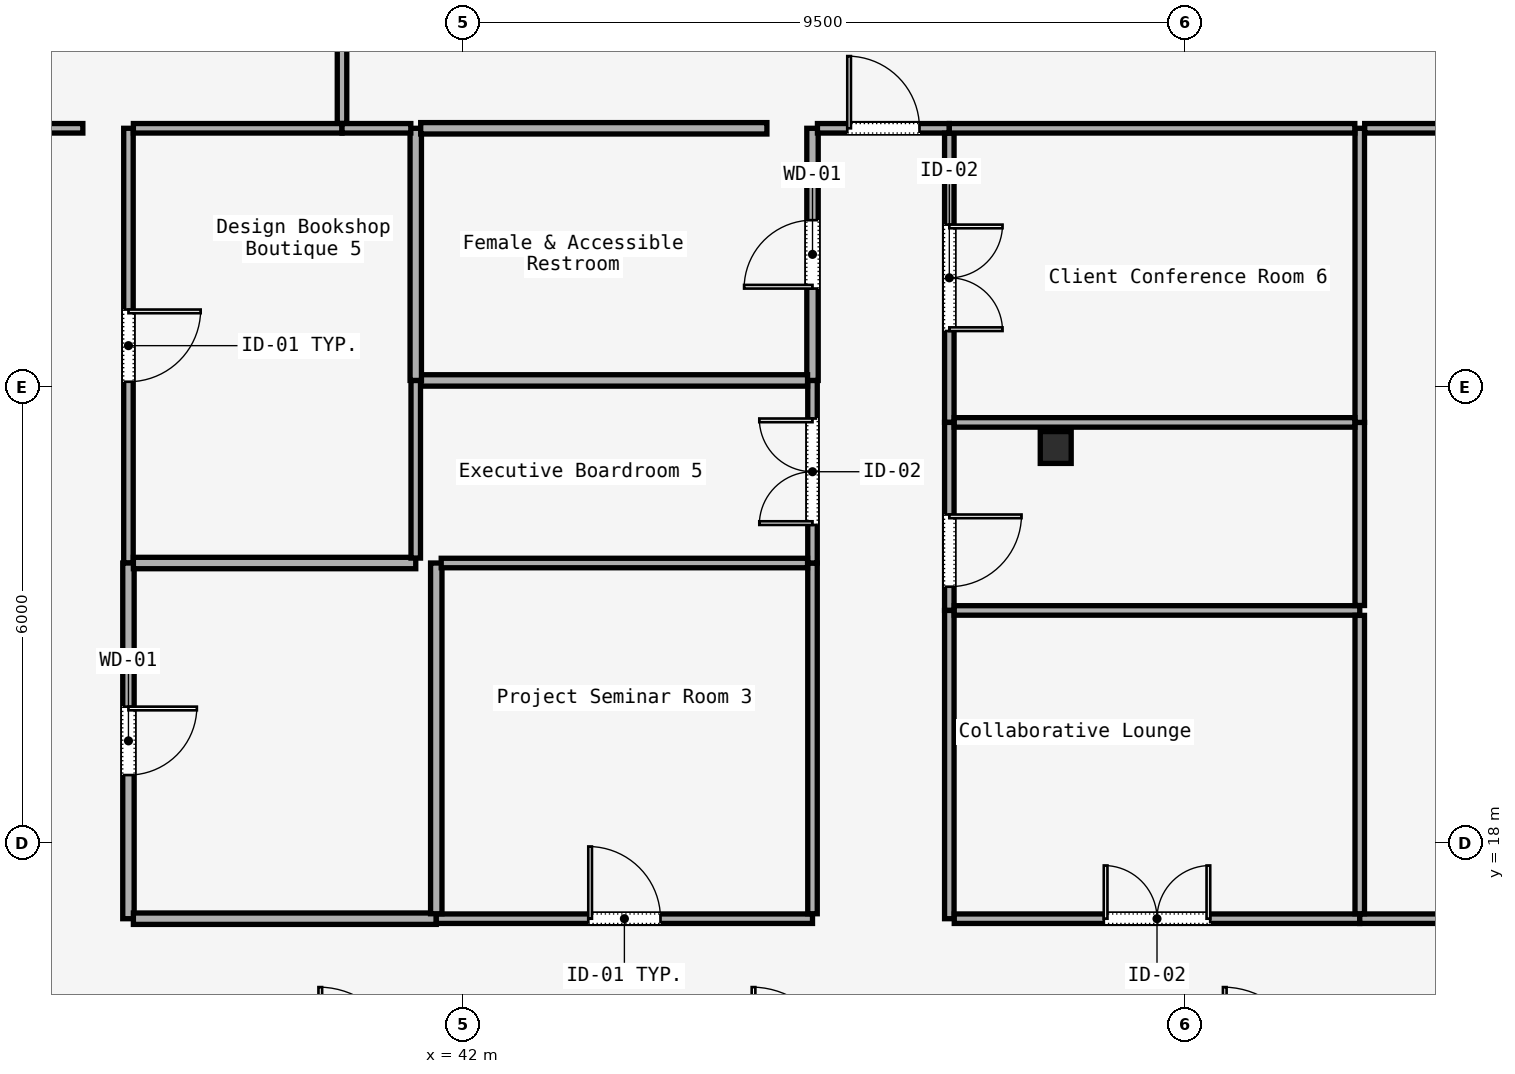
"""IFC4 building model, lengths in metres.
Left out: names, types, materials, properties, quantities, classifications, styles, units other than length and angle.
Written with IfcOpenShell. Run it as: python <this file> out.ifc"""

import sys

from ifc_helpers import new_model, si_unit, direction, frame, frame_2d, origin, origin_2d, place, context, subcontext, project, spatial, rectangle, i_section, extrude, element, fill, save


model = new_model("IFC4")
c1 = context("Model", 3, precision=1e-05, world=origin(), true_north=direction((0.0, 1.0)))
c2 = subcontext(c1, "Body", "Model", "MODEL_VIEW")
j1 = project(units=[si_unit("LENGTHUNIT", "METRE"), si_unit("PLANEANGLEUNIT", "RADIAN")], contexts=[c1])
p1 = place(None, origin())
s1 = spatial("IfcSite", under=j1, at=p1, CompositionType="ELEMENT")
p2 = place(p1, origin())
s2 = spatial("IfcBuilding", under=s1, at=p2, CompositionType="ELEMENT")
p3 = place(p2, frame((0.0, 0.0, 176.4)))
s3 = spatial("IfcBuildingStorey", under=s2, at=p3, CompositionType="ELEMENT", Elevation=176.4)
p4 = place(p3, frame((49.8, 23.2, 0.0), z_axis=(0.0, 0.0, 1.0), x_axis=(1.0, 0.0, 0.0)))
e1 = element("IfcColumn", 1, at=p4, inside=s3, PredefinedType="COLUMN", context=c2, shape_type="SweptSolid", body=[
    extrude(i_section(OverallWidth=0.407, OverallDepth=0.419, WebThickness=0.031, FlangeThickness=0.049, FilletRadius=0.015, at=origin_2d()), origin(), (0.0, 0.0, 1.0), 3.58),
])
p5 = place(p3, frame((35.865, 27.4, 0.0), z_axis=(0.0, 0.0, 1.0), x_axis=(1.0, 0.0, 0.0)))
e2 = element("IfcWall", 2, at=p5, inside=s3, PredefinedType="PARTITIONING", context=c2, shape_type="SweptSolid", body=[
    extrude(rectangle(XDim=1.135, YDim=0.125, at=frame_2d((0.567, 0.0))), origin(), (0.0, 0.0, 1.0), 3.01),
])
p6 = place(p3, frame((37.6, 27.4, 0.0), z_axis=(0.0, 0.0, 1.0), x_axis=(0.0, -1.0, 0.0)))
e3 = element("IfcWall", 3, at=p6, inside=s3, PredefinedType="PARTITIONING", context=c2, shape_type="SweptSolid", body=[
    extrude(rectangle(XDim=5.72, YDim=0.125, at=frame_2d((2.86, 0.0))), origin(), (0.0, 0.0, 1.0), 3.01),
])
p7 = place(p6, frame((2.385, 0.0, 0.0)))
e4 = element("IfcOpeningElement", 4, at=p7, cuts=e3, PredefinedType="OPENING", context=c2, shape_type="SweptSolid", body=[
    extrude(rectangle(XDim=0.95, YDim=2.2, at=frame_2d((0.475, 1.1))), frame((0.0, 0.062, 0.0), z_axis=(0.0, -1.0, 0.0), x_axis=(1.0, 0.0, 0.0)), (0.0, 0.0, 1.0), 0.125),
])
p8 = place(p3, frame((37.6, 21.68, 0.0), z_axis=(0.0, 0.0, 1.0), x_axis=(0.0, -1.0, 0.0)))
e5 = element("IfcWall", 5, at=p8, inside=s3, PredefinedType="PARTITIONING", context=c2, shape_type="SweptSolid", body=[
    extrude(rectangle(XDim=4.68, YDim=0.15, at=frame_2d((2.34, 0.0))), origin(), (0.0, 0.0, 1.0), 3.01),
])
p9 = place(p8, frame((1.89, 0.0, 0.0)))
e6 = element("IfcOpeningElement", 6, at=p9, cuts=e5, PredefinedType="OPENING", context=c2, shape_type="SweptSolid", body=[
    extrude(rectangle(XDim=0.9, YDim=2.15, at=frame_2d((0.45, 1.075))), frame((0.0, 0.075, 0.0), z_axis=(0.0, -1.0, 0.0), x_axis=(1.0, 0.0, 0.0)), (0.0, 0.0, 1.0), 0.15),
])
p10 = place(p3, frame((37.665, 17.0, 0.0), z_axis=(0.0, 0.0, 1.0), x_axis=(1.0, 0.0, 0.0)))
e7 = element("IfcWall", 7, at=p10, inside=s3, PredefinedType="PARTITIONING", context=c2, shape_type="SweptSolid", body=[
    extrude(rectangle(XDim=3.985, YDim=0.15, at=frame_2d((1.992, 0.0))), origin(), (0.0, 0.0, 1.0), 3.01),
])
p11 = place(p3, frame((41.65, 17.0, 0.0), z_axis=(0.0, 0.0, 1.0), x_axis=(1.0, 0.0, 0.0)))
e8 = element("IfcWall", 8, at=p11, inside=s3, PredefinedType="PARTITIONING", context=c2, shape_type="SweptSolid", body=[
    extrude(rectangle(XDim=4.95, YDim=0.125, at=frame_2d((2.475, 0.0))), origin(), (0.0, 0.0, 1.0), 3.01),
])
p12 = place(p11, frame((2.0, 0.0, 0.0)))
e9 = element("IfcOpeningElement", 9, at=p12, cuts=e8, PredefinedType="OPENING", context=c2, shape_type="SweptSolid", body=[
    extrude(rectangle(XDim=0.95, YDim=2.2, at=frame_2d((0.475, 1.1))), frame((0.0, 0.062, 0.0), z_axis=(0.0, -1.0, 0.0), x_axis=(1.0, 0.0, 0.0)), (0.0, 0.0, 1.0), 0.125),
])
p13 = place(p3, frame((46.6, 17.065, 0.0), z_axis=(0.0, 0.0, 1.0), x_axis=(0.0, 1.0, 0.0)))
e10 = element("IfcWall", 10, at=p13, inside=s3, PredefinedType="PARTITIONING", context=c2, shape_type="SweptSolid", body=[
    extrude(rectangle(XDim=4.615, YDim=0.125, at=frame_2d((2.308, 0.0))), origin(), (0.0, 0.0, 1.0), 3.01),
])
p14 = place(p3, frame((46.6, 21.68, 0.0), z_axis=(0.0, 0.0, 1.0), x_axis=(0.0, 1.0, 0.0)))
e11 = element("IfcWall", 11, at=p14, inside=s3, PredefinedType="PARTITIONING", context=c2, shape_type="SweptSolid", body=[
    extrude(rectangle(XDim=2.403, YDim=0.125, at=frame_2d((1.201, 0.0))), origin(), (0.0, 0.0, 1.0), 3.01),
])
p15 = place(p14, frame((0.501, 0.0, 0.0)))
e12 = element("IfcOpeningElement", 12, at=p15, cuts=e11, PredefinedType="OPENING", context=c2, shape_type="SweptSolid", body=[
    extrude(rectangle(XDim=1.4, YDim=2.2, at=frame_2d((0.7, 1.1))), frame((0.0, 0.062, 0.0), z_axis=(0.0, -1.0, 0.0), x_axis=(1.0, 0.0, 0.0)), (0.0, 0.0, 1.0), 0.125),
])
p16 = place(p3, frame((46.6, 24.083, 0.0), z_axis=(0.0, 0.0, 1.0), x_axis=(0.0, 1.0, 0.0)))
e13 = element("IfcWall", 13, at=p16, inside=s3, PredefinedType="PARTITIONING", context=c2, shape_type="SweptSolid", body=[
    extrude(rectangle(XDim=3.317, YDim=0.15, at=frame_2d((1.659, 0.0))), origin(), (0.0, 0.0, 1.0), 3.01),
])
p17 = place(p16, frame((1.209, 0.0, 0.0)))
e14 = element("IfcOpeningElement", 14, at=p17, cuts=e13, PredefinedType="OPENING", context=c2, shape_type="SweptSolid", body=[
    extrude(rectangle(XDim=0.9, YDim=2.15, at=frame_2d((0.45, 1.075))), frame((0.0, 0.075, 0.0), z_axis=(0.0, -1.0, 0.0), x_axis=(1.0, 0.0, 0.0)), (0.0, 0.0, 1.0), 0.15),
])
p18 = place(p3, frame((46.665, 27.4, 0.0), z_axis=(0.0, 0.0, 1.0), x_axis=(1.0, 0.0, 0.0)))
e15 = element("IfcWall", 15, at=p18, inside=s3, PredefinedType="PARTITIONING", context=c2, shape_type="SweptSolid", body=[
    extrude(rectangle(XDim=1.735, YDim=0.125, at=frame_2d((0.867, 0.0))), origin(), (0.0, 0.0, 1.0), 3.01),
])
p19 = place(p18, frame((0.393, 0.0, 0.0)))
e16 = element("IfcOpeningElement", 16, at=p19, cuts=e15, PredefinedType="OPENING", context=c2, shape_type="SweptSolid", body=[
    extrude(rectangle(XDim=0.95, YDim=2.2, at=frame_2d((0.475, 1.1))), frame((0.0, 0.062, 0.0), z_axis=(0.0, -1.0, 0.0), x_axis=(1.0, 0.0, 0.0)), (0.0, 0.0, 1.0), 0.125),
])
p20 = place(p3, frame((48.4, 27.335, 0.0), z_axis=(0.0, 0.0, 1.0), x_axis=(0.0, -1.0, 0.0)))
e17 = element("IfcWall", 17, at=p20, inside=s3, PredefinedType="PARTITIONING", context=c2, shape_type="SweptSolid", body=[
    extrude(rectangle(XDim=3.805, YDim=0.125, at=frame_2d((1.902, 0.0))), origin(), (0.0, 0.0, 1.0), 3.01),
])
p21 = place(p20, frame((1.202, 0.0, 0.0)))
e18 = element("IfcOpeningElement", 18, at=p21, cuts=e17, PredefinedType="OPENING", context=c2, shape_type="SweptSolid", body=[
    extrude(rectangle(XDim=1.4, YDim=2.2, at=frame_2d((0.7, 1.1))), frame((0.0, 0.062, 0.0), z_axis=(0.0, -1.0, 0.0), x_axis=(1.0, 0.0, 0.0)), (0.0, 0.0, 1.0), 0.125),
])
p22 = place(p3, frame((48.4, 23.53, 0.0), z_axis=(0.0, 0.0, 1.0), x_axis=(0.0, -1.0, 0.0)))
e19 = element("IfcWall", 19, at=p22, inside=s3, PredefinedType="PARTITIONING", context=c2, shape_type="SweptSolid", body=[
    extrude(rectangle(XDim=2.474, YDim=0.125, at=frame_2d((1.237, 0.0))), origin(), (0.0, 0.0, 1.0), 3.01),
])
p23 = place(p22, frame((1.212, 0.0, 0.0)))
e20 = element("IfcOpeningElement", 20, at=p23, cuts=e19, PredefinedType="OPENING", context=c2, shape_type="SweptSolid", body=[
    extrude(rectangle(XDim=0.95, YDim=2.2, at=frame_2d((0.475, 1.1))), frame((0.0, 0.062, 0.0), z_axis=(0.0, -1.0, 0.0), x_axis=(1.0, 0.0, 0.0)), (0.0, 0.0, 1.0), 0.125),
])
p24 = place(p3, frame((48.4, 21.056, 0.0), z_axis=(0.0, 0.0, 1.0), x_axis=(0.0, -1.0, 0.0)))
e21 = element("IfcWall", 21, at=p24, inside=s3, PredefinedType="PARTITIONING", context=c2, shape_type="SweptSolid", body=[
    extrude(rectangle(XDim=4.056, YDim=0.125, at=frame_2d((2.028, 0.0))), origin(), (0.0, 0.0, 1.0), 3.01),
])
p25 = place(p3, frame((48.465, 17.0, 0.0), z_axis=(0.0, 0.0, 1.0), x_axis=(1.0, 0.0, 0.0)))
e22 = element("IfcWall", 22, at=p25, inside=s3, PredefinedType="PARTITIONING", context=c2, shape_type="SweptSolid", body=[
    extrude(rectangle(XDim=5.335, YDim=0.125, at=frame_2d((2.667, 0.0))), origin(), (0.0, 0.0, 1.0), 3.01),
])
p26 = place(p25, frame((1.968, 0.0, 0.0)))
e23 = element("IfcOpeningElement", 23, at=p26, cuts=e22, PredefinedType="OPENING", context=c2, shape_type="SweptSolid", body=[
    extrude(rectangle(XDim=1.4, YDim=2.2, at=frame_2d((0.7, 1.1))), frame((0.0, 0.062, 0.0), z_axis=(0.0, -1.0, 0.0), x_axis=(1.0, 0.0, 0.0)), (0.0, 0.0, 1.0), 0.125),
])
p27 = place(p3, frame((53.8, 17.0, 0.0), z_axis=(0.0, 0.0, 1.0), x_axis=(1.0, 0.0, 0.0)))
e24 = element("IfcWall", 24, at=p27, inside=s3, PredefinedType="PARTITIONING", context=c2, shape_type="SweptSolid", body=[
    extrude(rectangle(XDim=4.535, YDim=0.125, at=frame_2d((2.268, 0.0))), origin(), (0.0, 0.0, 1.0), 3.01),
])
p28 = place(p27, frame((1.792, 0.0, 0.0)))
e25 = element("IfcOpeningElement", 25, at=p28, cuts=e24, PredefinedType="OPENING", context=c2, shape_type="SweptSolid", body=[
    extrude(rectangle(XDim=0.95, YDim=2.2, at=frame_2d((0.475, 1.1))), frame((0.0, 0.062, 0.0), z_axis=(0.0, -1.0, 0.0), x_axis=(1.0, 0.0, 0.0)), (0.0, 0.0, 1.0), 0.125),
])
p29 = place(p3, frame((48.465, 21.056, 0.0), z_axis=(0.0, 0.0, 1.0), x_axis=(1.0, 0.0, 0.0)))
e26 = element("IfcWall", 26, at=p29, inside=s3, PredefinedType="PARTITIONING", context=c2, shape_type="SweptSolid", body=[
    extrude(rectangle(XDim=5.335, YDim=0.125, at=frame_2d((2.667, 0.0))), origin(), (0.0, 0.0, 1.0), 3.01),
])
p30 = place(p3, frame((53.8, 20.991, 0.0), z_axis=(0.0, 0.0, 1.0), x_axis=(0.0, -1.0, 0.0)))
e27 = element("IfcWall", 27, at=p30, inside=s3, PredefinedType="PARTITIONING", context=c2, shape_type="SweptSolid", body=[
    extrude(rectangle(XDim=3.926, YDim=0.125, at=frame_2d((1.963, 0.0))), origin(), (0.0, 0.0, 1.0), 3.01),
])
p31 = place(p3, frame((41.65, 21.68, 0.0), z_axis=(0.0, 0.0, 1.0), x_axis=(0.0, -1.0, 0.0)))
e28 = element("IfcWall", 28, at=p31, inside=s3, PredefinedType="PARTITIONING", context=c2, shape_type="SweptSolid", body=[
    extrude(rectangle(XDim=4.615, YDim=0.15, at=frame_2d((2.308, 0.0))), origin(), (0.0, 0.0, 1.0), 3.01),
])
p32 = place(p3, frame((37.665, 21.68, 0.0), z_axis=(0.0, 0.0, 1.0), x_axis=(1.0, 0.0, 0.0)))
e29 = element("IfcWall", 29, at=p32, inside=s3, PredefinedType="PARTITIONING", context=c2, shape_type="SweptSolid", body=[
    extrude(rectangle(XDim=3.715, YDim=0.15, at=frame_2d((1.857, 0.0))), origin(), (0.0, 0.0, 1.0), 3.01),
])
p33 = place(p3, frame((41.715, 21.68, 0.0), z_axis=(0.0, 0.0, 1.0), x_axis=(1.0, 0.0, 0.0)))
e30 = element("IfcWall", 30, at=p33, inside=s3, PredefinedType="PARTITIONING", context=c2, shape_type="SweptSolid", body=[
    extrude(rectangle(XDim=4.82, YDim=0.125, at=frame_2d((2.41, 0.0))), origin(), (0.0, 0.0, 1.0), 3.01),
])
p34 = place(p3, frame((53.8, 21.121, 0.0), z_axis=(0.0, 0.0, 1.0), x_axis=(0.0, 1.0, 0.0)))
e31 = element("IfcWall", 31, at=p34, inside=s3, PredefinedType="PARTITIONING", context=c2, shape_type="SweptSolid", body=[
    extrude(rectangle(XDim=2.409, YDim=0.125, at=frame_2d((1.205, 0.0))), origin(), (0.0, 0.0, 1.0), 3.01),
])
p35 = place(p3, frame((53.8, 23.53, 0.0), z_axis=(0.0, 0.0, 1.0), x_axis=(0.0, 1.0, 0.0)))
e32 = element("IfcWall", 32, at=p35, inside=s3, PredefinedType="PARTITIONING", context=c2, shape_type="SweptSolid", body=[
    extrude(rectangle(XDim=3.87, YDim=0.125, at=frame_2d((1.935, 0.0))), origin(), (0.0, 0.0, 1.0), 3.01),
])
p36 = place(p3, frame((53.865, 27.4, 0.0), z_axis=(0.0, 0.0, 1.0), x_axis=(1.0, 0.0, 0.0)))
e33 = element("IfcWall", 33, at=p36, inside=s3, PredefinedType="PARTITIONING", context=c2, shape_type="SweptSolid", body=[
    extrude(rectangle(XDim=4.036, YDim=0.125, at=frame_2d((2.018, 0.0))), origin(), (0.0, 0.0, 1.0), 3.01),
])
p37 = place(p3, frame((48.465, 23.53, 0.0), z_axis=(0.0, 0.0, 1.0), x_axis=(1.0, 0.0, 0.0)))
e34 = element("IfcWall", 34, at=p37, inside=s3, PredefinedType="PARTITIONING", context=c2, shape_type="SweptSolid", body=[
    extrude(rectangle(XDim=5.27, YDim=0.125, at=frame_2d((2.635, 0.0))), origin(), (0.0, 0.0, 1.0), 3.01),
])
p38 = place(p3, frame((41.38, 21.745, 0.0), z_axis=(0.0, 0.0, 1.0), x_axis=(0.0, 1.0, 0.0)))
e35 = element("IfcWall", 35, at=p38, inside=s3, PredefinedType="PARTITIONING", context=c2, shape_type="SweptSolid", body=[
    extrude(rectangle(XDim=2.337, YDim=0.125, at=frame_2d((1.169, 0.0))), origin(), (0.0, 0.0, 1.0), 3.01),
])
p39 = place(p3, frame((41.445, 24.083, 0.0), z_axis=(0.0, 0.0, 1.0), x_axis=(1.0, 0.0, 0.0)))
e36 = element("IfcWall", 36, at=p39, inside=s3, PredefinedType="PARTITIONING", context=c2, shape_type="SweptSolid", body=[
    extrude(rectangle(XDim=5.09, YDim=0.15, at=frame_2d((2.545, 0.0))), origin(), (0.0, 0.0, 1.0), 3.01),
])
p40 = place(p3, frame((41.38, 27.4, 0.0), z_axis=(0.0, 0.0, 1.0), x_axis=(0.0, -1.0, 0.0)))
e37 = element("IfcWall", 37, at=p40, inside=s3, PredefinedType="PARTITIONING", context=c2, shape_type="SweptSolid", body=[
    extrude(rectangle(XDim=3.317, YDim=0.15, at=frame_2d((1.659, 0.0))), origin(), (0.0, 0.0, 1.0), 3.01),
])
p41 = place(p3, frame((37.665, 27.4, 0.0), z_axis=(0.0, 0.0, 1.0), x_axis=(1.0, 0.0, 0.0)))
e38 = element("IfcWall", 38, at=p41, inside=s3, PredefinedType="PARTITIONING", context=c2, shape_type="SweptSolid", body=[
    extrude(rectangle(XDim=2.745, YDim=0.125, at=frame_2d((1.373, 0.0))), origin(), (0.0, 0.0, 1.0), 3.01),
])
p42 = place(p3, frame((40.41, 27.4, 0.0), z_axis=(0.0, 0.0, 1.0), x_axis=(1.0, 0.0, 0.0)))
e39 = element("IfcWall", 39, at=p42, inside=s3, PredefinedType="PARTITIONING", context=c2, shape_type="SweptSolid", body=[
    extrude(rectangle(XDim=0.905, YDim=0.125, at=frame_2d((0.453, 0.0))), origin(), (0.0, 0.0, 1.0), 3.01),
])
p43 = place(p3, frame((48.4, 27.4, 0.0), z_axis=(0.0, 0.0, 1.0), x_axis=(1.0, 0.0, 0.0)))
e40 = element("IfcWall", 40, at=p43, inside=s3, PredefinedType="PARTITIONING", context=c2, shape_type="SweptSolid", body=[
    extrude(rectangle(XDim=5.335, YDim=0.125, at=frame_2d((2.667, 0.0))), origin(), (0.0, 0.0, 1.0), 3.01),
])
p44 = place(p3, frame((41.445, 27.4, 0.0), z_axis=(0.0, 0.0, 1.0), x_axis=(1.0, 0.0, 0.0)))
e41 = element("IfcWall", 41, at=p44, inside=s3, PredefinedType="PARTITIONING", context=c2, shape_type="SweptSolid", body=[
    extrude(rectangle(XDim=4.555, YDim=0.15, at=frame_2d((2.277, 0.0))), origin(), (0.0, 0.0, 1.0), 3.01),
])
p45 = place(p3, frame((40.41, 46.248, 0.0), z_axis=(0.0, 0.0, 1.0), x_axis=(0.0, -1.0, 0.0)))
e42 = element("IfcWall", 42, at=p45, inside=s3, PredefinedType="PARTITIONING", context=c2, shape_type="SweptSolid", body=[
    extrude(rectangle(XDim=18.783, YDim=0.125, at=frame_2d((9.392, 0.0))), origin(), (0.0, 0.0, 1.0), 3.01),
])
p46 = place(p45, frame((8.967, 0.0, 0.0)))
e43 = element("IfcOpeningElement", 43, at=p46, cuts=e42, PredefinedType="OPENING", context=c2, shape_type="SweptSolid", body=[
    extrude(rectangle(XDim=0.85, YDim=2.15, at=frame_2d((0.425, 1.075))), frame((0.0, 0.062, 0.0), z_axis=(0.0, -1.0, 0.0), x_axis=(1.0, 0.0, 0.0)), (0.0, 0.0, 1.0), 0.125),
])
p47 = place(p26, origin())
e44 = element("IfcDoor", 44, at=p47, inside=s3, OperationType="SINGLE_SWING_LEFT", PredefinedType="DOOR", context=c2, shape_type="SweptSolid", body=[
    extrude(rectangle(XDim=1.4, YDim=2.2, at=frame_2d((0.7, 1.1))), frame((0.0, 0.025, 0.0), z_axis=(0.0, -1.0, 0.0), x_axis=(1.0, 0.0, 0.0)), (0.0, 0.0, 1.0), 0.05),
])
fill(e23, e44)
p48 = place(p9, origin())
e45 = element("IfcDoor", 45, at=p48, inside=s3, OperationType="SINGLE_SWING_RIGHT", PredefinedType="DOOR", context=c2, shape_type="SweptSolid", body=[
    extrude(rectangle(XDim=0.9, YDim=2.15, at=frame_2d((0.45, 1.075))), frame((0.0, 0.025, 0.0), z_axis=(0.0, -1.0, 0.0), x_axis=(1.0, 0.0, 0.0)), (0.0, 0.0, 1.0), 0.05),
])
fill(e6, e45)
p49 = place(p12, origin())
e46 = element("IfcDoor", 46, at=p49, inside=s3, OperationType="SINGLE_SWING_LEFT", PredefinedType="DOOR", context=c2, shape_type="SweptSolid", body=[
    extrude(rectangle(XDim=0.95, YDim=2.2, at=frame_2d((0.475, 1.1))), frame((0.0, 0.025, 0.0), z_axis=(0.0, -1.0, 0.0), x_axis=(1.0, 0.0, 0.0)), (0.0, 0.0, 1.0), 0.05),
])
fill(e9, e46)
p50 = place(p23, origin())
e47 = element("IfcDoor", 47, at=p50, inside=s3, OperationType="SINGLE_SWING_RIGHT", PredefinedType="DOOR", context=c2, shape_type="SweptSolid", body=[
    extrude(rectangle(XDim=0.95, YDim=2.2, at=frame_2d((0.475, 1.1))), frame((0.0, 0.025, 0.0), z_axis=(0.0, -1.0, 0.0), x_axis=(1.0, 0.0, 0.0)), (0.0, 0.0, 1.0), 0.05),
])
fill(e20, e47)
p51 = place(p15, origin())
e48 = element("IfcDoor", 48, at=p51, inside=s3, OperationType="SINGLE_SWING_RIGHT", PredefinedType="DOOR", context=c2, shape_type="SweptSolid", body=[
    extrude(rectangle(XDim=1.4, YDim=2.2, at=frame_2d((0.7, 1.1))), frame((0.0, 0.025, 0.0), z_axis=(0.0, -1.0, 0.0), x_axis=(1.0, 0.0, 0.0)), (0.0, 0.0, 1.0), 0.05),
])
fill(e12, e48)
p52 = place(p7, origin())
e49 = element("IfcDoor", 49, at=p52, inside=s3, OperationType="SINGLE_SWING_LEFT", PredefinedType="DOOR", context=c2, shape_type="SweptSolid", body=[
    extrude(rectangle(XDim=0.95, YDim=2.2, at=frame_2d((0.475, 1.1))), frame((0.0, 0.025, 0.0), z_axis=(0.0, -1.0, 0.0), x_axis=(1.0, 0.0, 0.0)), (0.0, 0.0, 1.0), 0.05),
])
fill(e4, e49)
p53 = place(p21, origin())
e50 = element("IfcDoor", 50, at=p53, inside=s3, OperationType="SINGLE_SWING_RIGHT", PredefinedType="DOOR", context=c2, shape_type="SweptSolid", body=[
    extrude(rectangle(XDim=1.4, YDim=2.2, at=frame_2d((0.7, 1.1))), frame((0.0, 0.025, 0.0), z_axis=(0.0, -1.0, 0.0), x_axis=(1.0, 0.0, 0.0)), (0.0, 0.0, 1.0), 0.05),
])
fill(e18, e50)
p54 = place(p17, origin())
e51 = element("IfcDoor", 51, at=p54, inside=s3, OperationType="SINGLE_SWING_RIGHT", PredefinedType="DOOR", context=c2, shape_type="SweptSolid", body=[
    extrude(rectangle(XDim=0.9, YDim=2.15, at=frame_2d((0.45, 1.075))), frame((0.0, 0.025, 0.0), z_axis=(0.0, -1.0, 0.0), x_axis=(1.0, 0.0, 0.0)), (0.0, 0.0, 1.0), 0.05),
])
fill(e14, e51)
p55 = place(p19, origin())
e52 = element("IfcDoor", 52, at=p55, inside=s3, OperationType="SINGLE_SWING_RIGHT", PredefinedType="DOOR", context=c2, shape_type="SweptSolid", body=[
    extrude(rectangle(XDim=0.95, YDim=2.2, at=frame_2d((0.475, 1.1))), frame((0.0, 0.025, 0.0), z_axis=(0.0, -1.0, 0.0), x_axis=(1.0, 0.0, 0.0)), (0.0, 0.0, 1.0), 0.05),
])
fill(e16, e52)
save(model, sys.argv[1])
